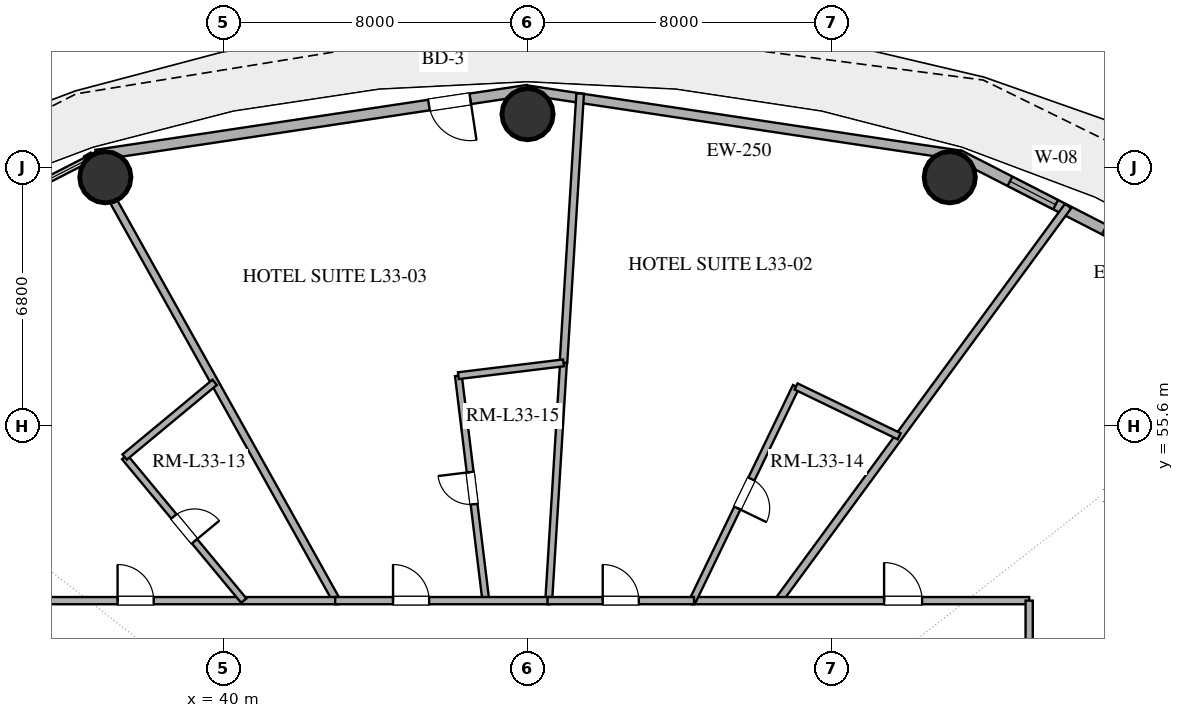
"""IFC4 building model, lengths in metres.
Left out: names, types, materials, properties, quantities, classifications, styles, units other than length and angle.
Written with IfcOpenShell. Run it as: python <this file> out.ifc"""

import sys

from ifc_helpers import new_model, si_unit, direction, frame, frame_2d, origin, origin_2d, place, context, subcontext, project, spatial, rectangle, hollow_circle, extrude, element, fill, save


model = new_model("IFC4")
c1 = context("Model", 3, precision=1e-05, world=origin(), true_north=direction((0.0, 1.0)))
c2 = subcontext(c1, "Body", "Model", "MODEL_VIEW")
j1 = project(units=[si_unit("LENGTHUNIT", "METRE"), si_unit("PLANEANGLEUNIT", "RADIAN")], contexts=[c1])
p1 = place(None, origin())
s1 = spatial("IfcSite", under=j1, at=p1, CompositionType="ELEMENT")
p2 = place(p1, origin())
s2 = spatial("IfcBuilding", under=s1, at=p2, CompositionType="ELEMENT")
p3 = place(p2, frame((0.0, 0.0, 130.8)))
s3 = spatial("IfcBuildingStorey", under=s2, at=p3, CompositionType="ELEMENT", Elevation=130.8)
for number, where, z_axis, x_axis in (
    (1, (59.11, 62.141, 0.0), (0.0, 0.0, 1.0), (1.0, 0.0, 0.0)),
    (2, (48.0, 63.8, 0.0), (0.0, 0.0, 1.0), (1.0, 0.0, 0.0)),
    (3, (36.89, 62.141, 0.0), (0.0, 0.0, 1.0), (1.0, 0.0, 0.0)),
):
    element("IfcColumn", number, at=place(p3, frame(where, z_axis=z_axis, x_axis=x_axis)), inside=s3, PredefinedType="COLUMN", context=c2, shape_type="SweptSolid", body=[
        extrude(hollow_circle(Radius=0.675, WallThickness=0.036, at=origin_2d()), origin(), (0.0, 0.0, 1.0), 3.32),
    ])
p4 = place(p3, frame((68.84, 57.86, 0.0), z_axis=(0.0, 0.0, 1.0), x_axis=(-0.889959505023, 0.45603955905, 0.0)))
e4 = element("IfcWall", 4, at=p4, inside=s3, PredefinedType="SOLIDWALL", context=c2, shape_type="SweptSolid", body=[
    extrude(rectangle(XDim=10.662, YDim=0.28, at=frame_2d((5.331, 0.0))), origin(), (0.0, 0.0, 1.0), 3.32),
])
p5 = place(p4, frame((2.475, 0.0, 0.85)))
e5 = element("IfcOpeningElement", 5, at=p5, cuts=e4, PredefinedType="OPENING", context=c2, shape_type="SweptSolid", body=[
    extrude(rectangle(XDim=1.5, YDim=1.8, at=frame_2d((0.75, 0.9))), frame((0.0, 0.15, 0.0), z_axis=(0.0, -1.0, 0.0), x_axis=(1.0, 0.0, 0.0)), (0.0, 0.0, 1.0), 0.3),
])
p6 = place(p4, frame((4.86, 0.0, 0.85)))
e6 = element("IfcOpeningElement", 6, at=p6, cuts=e4, PredefinedType="OPENING", context=c2, shape_type="SweptSolid", body=[
    extrude(rectangle(XDim=1.5, YDim=1.8, at=frame_2d((0.75, 0.9))), frame((0.0, 0.15, 0.0), z_axis=(0.0, -1.0, 0.0), x_axis=(1.0, 0.0, 0.0)), (0.0, 0.0, 1.0), 0.3),
])
p7 = place(p4, frame((7.803, 0.0, 0.85)))
e7 = element("IfcOpeningElement", 7, at=p7, cuts=e4, PredefinedType="OPENING", context=c2, shape_type="SweptSolid", body=[
    extrude(rectangle(XDim=1.35, YDim=1.8, at=frame_2d((0.675, 0.9))), frame((0.0, 0.15, 0.0), z_axis=(0.0, -1.0, 0.0), x_axis=(1.0, 0.0, 0.0)), (0.0, 0.0, 1.0), 0.3),
])
p8 = place(p3, frame((59.351, 62.723, 0.0), z_axis=(0.0, 0.0, 1.0), x_axis=(-0.988877774656, 0.148730450117, 0.0)))
e8 = element("IfcWall", 8, at=p8, inside=s3, PredefinedType="SOLIDWALL", context=c2, shape_type="SweptSolid", body=[
    extrude(rectangle(XDim=11.479, YDim=0.25, at=frame_2d((5.74, 0.0))), origin(), (0.0, 0.0, 1.0), 3.32),
])
p9 = place(p3, frame((48.0, 64.43, 0.0), z_axis=(0.0, 0.0, 1.0), x_axis=(-0.988877774656, -0.148730450117, 0.0)))
e9 = element("IfcWall", 9, at=p9, inside=s3, PredefinedType="SOLIDWALL", context=c2, shape_type="SweptSolid", body=[
    extrude(rectangle(XDim=11.479, YDim=0.28, at=frame_2d((5.74, 0.0))), origin(), (0.0, 0.0, 1.0), 3.32),
])
p10 = place(p9, frame((1.524, 0.0, 0.0)))
e10 = element("IfcOpeningElement", 10, at=p10, cuts=e9, PredefinedType="OPENING", context=c2, shape_type="SweptSolid", body=[
    extrude(rectangle(XDim=1.1, YDim=2.25, at=frame_2d((0.55, 1.125))), frame((0.0, 0.15, 0.0), z_axis=(0.0, -1.0, 0.0), x_axis=(1.0, 0.0, 0.0)), (0.0, 0.0, 1.0), 0.3),
])
p11 = place(p3, frame((73.888, 51.938, 0.0), z_axis=(0.0, 0.0, 1.0), x_axis=(-0.933575508152, -0.358380762009, 0.0)))
e11 = element("IfcWall", 11, at=p11, inside=s3, PredefinedType="PARTITIONING", context=c2, shape_type="SweptSolid", body=[
    extrude(rectangle(XDim=13.591, YDim=0.2, at=frame_2d((6.796, 0.0))), origin(), (0.0, 0.0, 1.0), 2.68),
])
p12 = place(p3, frame((54.605, 51.0, 0.0), z_axis=(0.0, 0.0, 1.0), x_axis=(0.591626609971, 0.806212102597, 0.0)))
e12 = element("IfcWall", 12, at=p12, inside=s3, PredefinedType="PARTITIONING", context=c2, shape_type="SweptSolid", body=[
    extrude(rectangle(XDim=12.879, YDim=0.2, at=frame_2d((6.439, 0.0))), origin(), (0.0, 0.0, 1.0), 2.68),
])
p13 = place(p3, frame((49.384, 64.343, 0.0), z_axis=(0.0, 0.0, 1.0), x_axis=(-0.061825960445, -0.998086945419, 0.0)))
e13 = element("IfcWall", 13, at=p13, inside=s3, PredefinedType="PARTITIONING", context=c2, shape_type="SweptSolid", body=[
    extrude(rectangle(XDim=7.1, YDim=0.2, at=frame_2d((3.55, 0.0))), origin(), (0.0, 0.0, 1.0), 2.68),
])
p14 = place(p3, frame((42.974, 51.0, 0.0), z_axis=(0.0, 0.0, 1.0), x_axis=(-0.487587337482, 0.873074216964, 0.0)))
e14 = element("IfcWall", 14, at=p14, inside=s3, PredefinedType="PARTITIONING", context=c2, shape_type="SweptSolid", body=[
    extrude(rectangle(XDim=13.446, YDim=0.2, at=frame_2d((6.723, 0.0))), origin(), (0.0, 0.0, 1.0), 2.68),
])
p15 = place(p3, frame((52.31, 51.0, 0.0), z_axis=(0.0, 0.0, 1.0), x_axis=(1.0, 0.0, 0.0)))
e15 = element("IfcWall", 15, at=p15, inside=s3, PredefinedType="PARTITIONING", context=c2, shape_type="SweptSolid", body=[
    extrude(rectangle(XDim=8.89, YDim=0.19, at=frame_2d((4.445, 0.0))), origin(), (0.0, 0.0, 1.0), 2.68),
])
p16 = place(p15, frame((5.073, 0.0, 0.0)))
e16 = element("IfcOpeningElement", 16, at=p16, cuts=e15, PredefinedType="OPENING", context=c2, shape_type="SweptSolid", body=[
    extrude(rectangle(XDim=1.0, YDim=2.2, at=frame_2d((0.5, 1.1))), frame((0.0, 0.105, 0.0), z_axis=(0.0, -1.0, 0.0), x_axis=(1.0, 0.0, 0.0)), (0.0, 0.0, 1.0), 0.21),
])
p17 = place(p3, frame((48.945, 57.256, 0.0), z_axis=(0.0, 0.0, 1.0), x_axis=(-0.061849673623, -0.998085476236, 0.0)))
e17 = element("IfcWall", 17, at=p17, inside=s3, PredefinedType="PLUMBINGWALL", context=c2, shape_type="SweptSolid", body=[
    extrude(rectangle(XDim=6.268, YDim=0.18, at=frame_2d((3.134, 0.0))), origin(), (0.0, 0.0, 1.0), 2.68),
])
p18 = place(p3, frame((55.066, 56.635, 0.0), z_axis=(0.0, 0.0, 1.0), x_axis=(-0.434810168298, -0.900522136066, 0.0)))
e18 = element("IfcWall", 18, at=p18, inside=s3, PredefinedType="PLUMBINGWALL", context=c2, shape_type="SweptSolid", body=[
    extrude(rectangle(XDim=6.257, YDim=0.18, at=frame_2d((3.129, 0.0))), origin(), (0.0, 0.0, 1.0), 2.68),
])
p19 = place(p18, frame((2.704, 0.0, 0.0)))
e19 = element("IfcOpeningElement", 19, at=p19, cuts=e18, PredefinedType="OPENING", context=c2, shape_type="SweptSolid", body=[
    extrude(rectangle(XDim=0.85, YDim=2.1, at=frame_2d((0.425, 1.05))), frame((0.0, 0.1, 0.0), z_axis=(0.0, -1.0, 0.0), x_axis=(1.0, 0.0, 0.0)), (0.0, 0.0, 1.0), 0.2),
])
p20 = place(p3, frame((46.902, 51.0, 0.0), z_axis=(0.0, 0.0, 1.0), x_axis=(-0.121066182793, 0.992644437542, 0.0)))
e20 = element("IfcWall", 20, at=p20, inside=s3, PredefinedType="PLUMBINGWALL", context=c2, shape_type="SweptSolid", body=[
    extrude(rectangle(XDim=5.963, YDim=0.18, at=frame_2d((2.981, 0.0))), origin(), (0.0, 0.0, 1.0), 2.68),
])
p21 = place(p20, frame((2.556, 0.0, 0.0)))
e21 = element("IfcOpeningElement", 21, at=p21, cuts=e20, PredefinedType="OPENING", context=c2, shape_type="SweptSolid", body=[
    extrude(rectangle(XDim=0.85, YDim=2.1, at=frame_2d((0.425, 1.05))), frame((0.0, 0.1, 0.0), z_axis=(0.0, -1.0, 0.0), x_axis=(1.0, 0.0, 0.0)), (0.0, 0.0, 1.0), 0.2),
])
p22 = place(p3, frame((34.8, 51.0, 0.0), z_axis=(0.0, 0.0, 1.0), x_axis=(1.0, 0.0, 0.0)))
e22 = element("IfcWall", 22, at=p22, inside=s3, PredefinedType="PARTITIONING", context=c2, shape_type="SweptSolid", body=[
    extrude(rectangle(XDim=8.21, YDim=0.19, at=frame_2d((4.105, 0.0))), origin(), (0.0, 0.0, 1.0), 2.68),
])
p23 = place(p22, frame((2.412, 0.0, 0.0)))
e23 = element("IfcOpeningElement", 23, at=p23, cuts=e22, PredefinedType="OPENING", context=c2, shape_type="SweptSolid", body=[
    extrude(rectangle(XDim=0.95, YDim=2.15, at=frame_2d((0.475, 1.075))), frame((0.0, 0.105, 0.0), z_axis=(0.0, -1.0, 0.0), x_axis=(1.0, 0.0, 0.0)), (0.0, 0.0, 1.0), 0.21),
])
p24 = place(p3, frame((61.2, 51.0, 0.0), z_axis=(0.0, 0.0, 1.0), x_axis=(0.0, -1.0, 0.0)))
e24 = element("IfcWall", 24, at=p24, inside=s3, PredefinedType="PARTITIONING", context=c2, shape_type="SweptSolid", body=[
    extrude(rectangle(XDim=9.315, YDim=0.19, at=frame_2d((4.657, 0.0))), origin(), (0.0, 0.0, 1.0), 2.68),
])
p25 = place(p24, frame((6.132, 0.0, 0.0)))
e25 = element("IfcOpeningElement", 25, at=p25, cuts=e24, PredefinedType="OPENING", context=c2, shape_type="SweptSolid", body=[
    extrude(rectangle(XDim=0.95, YDim=2.15, at=frame_2d((0.475, 1.075))), frame((0.0, 0.105, 0.0), z_axis=(0.0, -1.0, 0.0), x_axis=(1.0, 0.0, 0.0)), (0.0, 0.0, 1.0), 0.21),
])
p26 = place(p3, frame((37.398, 54.778, 0.0), z_axis=(0.0, 0.0, 1.0), x_axis=(0.638549285416, -0.769580931478, 0.0)))
e26 = element("IfcWall", 26, at=p26, inside=s3, PredefinedType="PLUMBINGWALL", context=c2, shape_type="SweptSolid", body=[
    extrude(rectangle(XDim=4.91, YDim=0.18, at=frame_2d((2.455, 0.0))), origin(), (0.0, 0.0, 1.0), 2.68),
])
p27 = place(p26, frame((2.03, 0.0, 0.0)))
e27 = element("IfcOpeningElement", 27, at=p27, cuts=e26, PredefinedType="OPENING", context=c2, shape_type="SweptSolid", body=[
    extrude(rectangle(XDim=0.85, YDim=2.1, at=frame_2d((0.425, 1.05))), frame((0.0, 0.1, 0.0), z_axis=(0.0, -1.0, 0.0), x_axis=(1.0, 0.0, 0.0)), (0.0, 0.0, 1.0), 0.2),
])
p28 = place(p3, frame((42.937, 51.0, 0.0), z_axis=(0.0, 0.0, 1.0), x_axis=(1.0, 0.0, 0.0)))
e28 = element("IfcWall", 28, at=p28, inside=s3, PredefinedType="PARTITIONING", context=c2, shape_type="SweptSolid", body=[
    extrude(rectangle(XDim=5.653, YDim=0.19, at=frame_2d((2.826, 0.0))), origin(), (0.0, 0.0, 1.0), 2.68),
])
p29 = place(p28, frame((1.524, 0.0, 0.0)))
e29 = element("IfcOpeningElement", 29, at=p29, cuts=e28, PredefinedType="OPENING", context=c2, shape_type="SweptSolid", body=[
    extrude(rectangle(XDim=0.95, YDim=2.15, at=frame_2d((0.475, 1.075))), frame((0.0, 0.105, 0.0), z_axis=(0.0, -1.0, 0.0), x_axis=(1.0, 0.0, 0.0)), (0.0, 0.0, 1.0), 0.21),
])
p30 = place(p3, frame((48.525, 51.0, 0.0), z_axis=(0.0, 0.0, 1.0), x_axis=(1.0, 0.0, 0.0)))
e30 = element("IfcWall", 30, at=p30, inside=s3, PredefinedType="PARTITIONING", context=c2, shape_type="SweptSolid", body=[
    extrude(rectangle(XDim=3.856, YDim=0.19, at=frame_2d((1.928, 0.0))), origin(), (0.0, 0.0, 1.0), 2.68),
])
p31 = place(p30, frame((1.453, 0.0, 0.0)))
e31 = element("IfcOpeningElement", 31, at=p31, cuts=e30, PredefinedType="OPENING", context=c2, shape_type="SweptSolid", body=[
    extrude(rectangle(XDim=0.95, YDim=2.15, at=frame_2d((0.475, 1.075))), frame((0.0, 0.105, 0.0), z_axis=(0.0, -1.0, 0.0), x_axis=(1.0, 0.0, 0.0)), (0.0, 0.0, 1.0), 0.21),
])
p32 = place(p3, frame((39.766, 56.743, 0.0), z_axis=(0.0, 0.0, 1.0), x_axis=(-0.769591554132, -0.638536482755, 0.0)))
e32 = element("IfcWall", 32, at=p32, inside=s3, PredefinedType="PLUMBINGWALL", context=c2, shape_type="SweptSolid", body=[
    extrude(rectangle(XDim=3.077, YDim=0.18, at=frame_2d((1.539, 0.0))), origin(), (0.0, 0.0, 1.0), 2.68),
])
p33 = place(p3, frame((57.779, 55.325, 0.0), z_axis=(0.0, 0.0, 1.0), x_axis=(-0.900534126875, 0.434785333623, 0.0)))
e33 = element("IfcWall", 33, at=p33, inside=s3, PredefinedType="PLUMBINGWALL", context=c2, shape_type="SweptSolid", body=[
    extrude(rectangle(XDim=3.012, YDim=0.18, at=frame_2d((1.506, 0.0))), origin(), (0.0, 0.0, 1.0), 2.68),
])
p34 = place(p3, frame((46.18, 56.919, 0.0), z_axis=(0.0, 0.0, 1.0), x_axis=(0.99264818918, 0.121035418441, 0.0)))
e34 = element("IfcWall", 34, at=p34, inside=s3, PredefinedType="PLUMBINGWALL", context=c2, shape_type="SweptSolid", body=[
    extrude(rectangle(XDim=2.786, YDim=0.18, at=frame_2d((1.393, 0.0))), origin(), (0.0, 0.0, 1.0), 2.68),
])
p35 = place(p7, origin())
e35 = element("IfcWindow", 35, at=p35, inside=s3, PartitioningType="SINGLE_PANEL", PredefinedType="WINDOW", context=c2, shape_type="SweptSolid", body=[
    extrude(rectangle(XDim=1.35, YDim=1.8, at=frame_2d((0.675, 0.9))), frame((0.0, 0.03, 0.0), z_axis=(0.0, -1.0, 0.0), x_axis=(1.0, 0.0, 0.0)), (0.0, 0.0, 1.0), 0.06),
])
fill(e7, e35)
p36 = place(p10, origin())
e36 = element("IfcDoor", 36, at=p36, inside=s3, OperationType="SINGLE_SWING_LEFT", PredefinedType="DOOR", context=c2, shape_type="SweptSolid", body=[
    extrude(rectangle(XDim=1.1, YDim=2.25, at=frame_2d((0.55, 1.125))), frame((0.0, 0.025, 0.0), z_axis=(0.0, -1.0, 0.0), x_axis=(1.0, 0.0, 0.0)), (0.0, 0.0, 1.0), 0.05),
])
fill(e10, e36)
p37 = place(p16, origin())
e37 = element("IfcDoor", 37, at=p37, inside=s3, OperationType="SINGLE_SWING_LEFT", PredefinedType="DOOR", context=c2, shape_type="SweptSolid", body=[
    extrude(rectangle(XDim=1.0, YDim=2.2, at=frame_2d((0.5, 1.1))), frame((0.0, 0.025, 0.0), z_axis=(0.0, -1.0, 0.0), x_axis=(1.0, 0.0, 0.0)), (0.0, 0.0, 1.0), 0.05),
])
fill(e16, e37)
p38 = place(p19, origin())
e38 = element("IfcDoor", 38, at=p38, inside=s3, OperationType="SINGLE_SWING_RIGHT", PredefinedType="DOOR", context=c2, shape_type="SweptSolid", body=[
    extrude(rectangle(XDim=0.85, YDim=2.1, at=frame_2d((0.425, 1.05))), frame((0.0, 0.025, 0.0), z_axis=(0.0, -1.0, 0.0), x_axis=(1.0, 0.0, 0.0)), (0.0, 0.0, 1.0), 0.05),
])
fill(e19, e38)
p39 = place(p21, origin())
e39 = element("IfcDoor", 39, at=p39, inside=s3, OperationType="SINGLE_SWING_RIGHT", PredefinedType="DOOR", context=c2, shape_type="SweptSolid", body=[
    extrude(rectangle(XDim=0.85, YDim=2.1, at=frame_2d((0.425, 1.05))), frame((0.0, 0.025, 0.0), z_axis=(0.0, -1.0, 0.0), x_axis=(1.0, 0.0, 0.0)), (0.0, 0.0, 1.0), 0.05),
])
fill(e21, e39)
p40 = place(p23, origin())
e40 = element("IfcDoor", 40, at=p40, inside=s3, OperationType="SINGLE_SWING_LEFT", PredefinedType="DOOR", context=c2, shape_type="SweptSolid", body=[
    extrude(rectangle(XDim=0.95, YDim=2.15, at=frame_2d((0.475, 1.075))), frame((0.0, 0.025, 0.0), z_axis=(0.0, -1.0, 0.0), x_axis=(1.0, 0.0, 0.0)), (0.0, 0.0, 1.0), 0.05),
])
fill(e23, e40)
p41 = place(p27, origin())
e41 = element("IfcDoor", 41, at=p41, inside=s3, OperationType="SINGLE_SWING_RIGHT", PredefinedType="DOOR", context=c2, shape_type="SweptSolid", body=[
    extrude(rectangle(XDim=0.85, YDim=2.1, at=frame_2d((0.425, 1.05))), frame((0.0, 0.025, 0.0), z_axis=(0.0, -1.0, 0.0), x_axis=(1.0, 0.0, 0.0)), (0.0, 0.0, 1.0), 0.05),
])
fill(e27, e41)
p42 = place(p29, origin())
e42 = element("IfcDoor", 42, at=p42, inside=s3, OperationType="SINGLE_SWING_LEFT", PredefinedType="DOOR", context=c2, shape_type="SweptSolid", body=[
    extrude(rectangle(XDim=0.95, YDim=2.15, at=frame_2d((0.475, 1.075))), frame((0.0, 0.025, 0.0), z_axis=(0.0, -1.0, 0.0), x_axis=(1.0, 0.0, 0.0)), (0.0, 0.0, 1.0), 0.05),
])
fill(e29, e42)
p43 = place(p31, origin())
e43 = element("IfcDoor", 43, at=p43, inside=s3, OperationType="SINGLE_SWING_LEFT", PredefinedType="DOOR", context=c2, shape_type="SweptSolid", body=[
    extrude(rectangle(XDim=0.95, YDim=2.15, at=frame_2d((0.475, 1.075))), frame((0.0, 0.025, 0.0), z_axis=(0.0, -1.0, 0.0), x_axis=(1.0, 0.0, 0.0)), (0.0, 0.0, 1.0), 0.05),
])
fill(e31, e43)
save(model, sys.argv[1])
